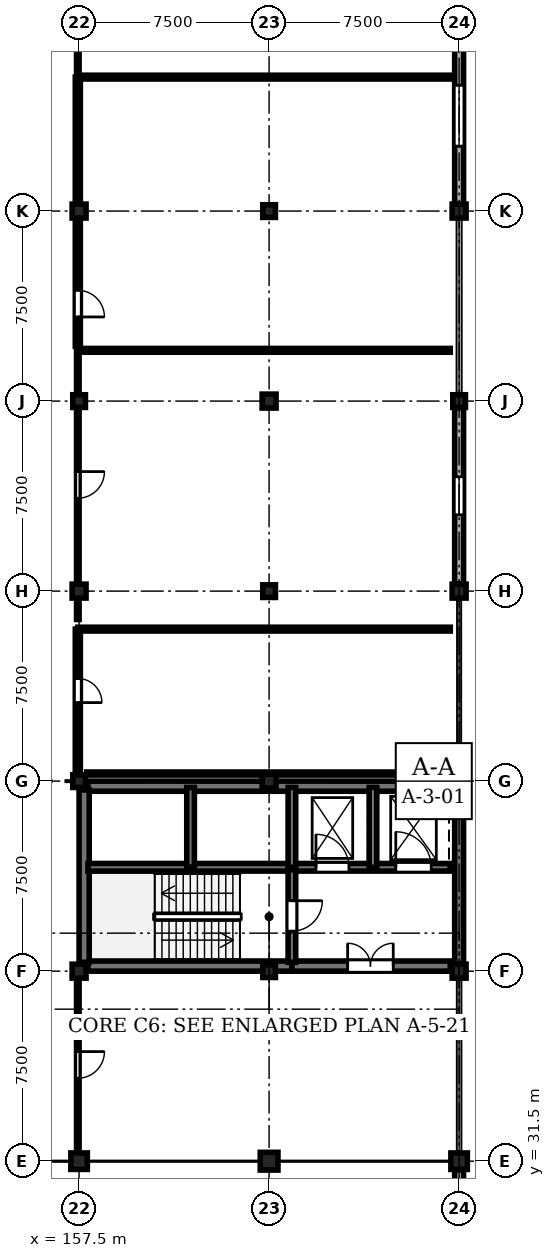
"""IFC4 building model, lengths in metres.
Left out: names, types, materials, properties, quantities, classifications, styles, units other than length and angle.
Written with IfcOpenShell. Run it as: python <this file> out.ifc"""

import sys

from ifc_helpers import new_model, si_unit, direction, frame, frame_2d, origin, origin_2d, place, context, subcontext, project, spatial, rectangle, extrude, element, fill, save


model = new_model("IFC4")
c1 = context("Model", 3, precision=1e-05, world=origin(), true_north=direction((0.0, 1.0)))
c2 = subcontext(c1, "Body", "Model", "MODEL_VIEW")
j1 = project(units=[si_unit("LENGTHUNIT", "METRE"), si_unit("PLANEANGLEUNIT", "RADIAN")], contexts=[c1])
p1 = place(None, origin())
s1 = spatial("IfcSite", under=j1, at=p1, CompositionType="ELEMENT")
p2 = place(p1, origin())
s2 = spatial("IfcBuilding", under=s1, at=p2, CompositionType="ELEMENT")
p3 = place(p2, frame((0.0, 0.0, 4.8)))
s3 = spatial("IfcBuildingStorey", under=s2, at=p3, CompositionType="ELEMENT", Elevation=4.8)
p4 = place(p3, frame((157.5, 31.5, 0.0), z_axis=(0.0, 0.0, 1.0), x_axis=(1.0, 0.0, 0.0)))
e1 = element("IfcColumn", 1, at=p4, inside=s3, PredefinedType="COLUMN", context=c2, shape_type="SweptSolid", body=[
    extrude(rectangle(XDim=0.65, YDim=0.65, at=origin_2d()), origin(), (0.0, 0.0, 1.0), 4.5),
])
p5 = place(p3, frame((157.5, 39.0, 0.0), z_axis=(0.0, 0.0, 1.0), x_axis=(1.0, 0.0, 0.0)))
e2 = element("IfcColumn", 2, at=p5, inside=s3, PredefinedType="COLUMN", context=c2, shape_type="SweptSolid", body=[
    extrude(rectangle(XDim=0.55, YDim=0.55, at=origin_2d()), origin(), (0.0, 0.0, 1.0), 4.5),
])
p6 = place(p3, frame((157.5, 46.5, 0.0), z_axis=(0.0, 0.0, 1.0), x_axis=(1.0, 0.0, 0.0)))
e3 = element("IfcColumn", 3, at=p6, inside=s3, PredefinedType="COLUMN", context=c2, shape_type="SweptSolid", body=[
    extrude(rectangle(XDim=0.5, YDim=0.5, at=origin_2d()), origin(), (0.0, 0.0, 1.0), 4.5),
])
p7 = place(p3, frame((157.5, 54.0, 0.0), z_axis=(0.0, 0.0, 1.0), x_axis=(1.0, 0.0, 0.0)))
e4 = element("IfcColumn", 4, at=p7, inside=s3, PredefinedType="COLUMN", context=c2, shape_type="SweptSolid", body=[
    extrude(rectangle(XDim=0.55, YDim=0.55, at=origin_2d()), origin(), (0.0, 0.0, 1.0), 4.5),
])
p8 = place(p3, frame((157.5, 61.5, 0.0), z_axis=(0.0, 0.0, 1.0), x_axis=(1.0, 0.0, 0.0)))
e5 = element("IfcColumn", 5, at=p8, inside=s3, PredefinedType="COLUMN", context=c2, shape_type="SweptSolid", body=[
    extrude(rectangle(XDim=0.5, YDim=0.5, at=origin_2d()), origin(), (0.0, 0.0, 1.0), 4.5),
])
p9 = place(p3, frame((157.5, 69.0, 0.0), z_axis=(0.0, 0.0, 1.0), x_axis=(1.0, 0.0, 0.0)))
e6 = element("IfcColumn", 6, at=p9, inside=s3, PredefinedType="COLUMN", context=c2, shape_type="SweptSolid", body=[
    extrude(rectangle(XDim=0.55, YDim=0.55, at=origin_2d()), origin(), (0.0, 0.0, 1.0), 4.5),
])
p10 = place(p3, frame((165.0, 31.5, 0.0), z_axis=(0.0, 0.0, 1.0), x_axis=(1.0, 0.0, 0.0)))
e7 = element("IfcColumn", 7, at=p10, inside=s3, PredefinedType="COLUMN", context=c2, shape_type="SweptSolid", body=[
    extrude(rectangle(XDim=0.7, YDim=0.7, at=origin_2d()), origin(), (0.0, 0.0, 1.0), 4.5),
])
p11 = place(p3, frame((165.0, 39.0, 0.0), z_axis=(0.0, 0.0, 1.0), x_axis=(1.0, 0.0, 0.0)))
e8 = element("IfcColumn", 8, at=p11, inside=s3, PredefinedType="COLUMN", context=c2, shape_type="SweptSolid", body=[
    extrude(rectangle(XDim=0.5, YDim=0.5, at=origin_2d()), origin(), (0.0, 0.0, 1.0), 4.5),
])
p12 = place(p3, frame((165.0, 46.5, 0.0), z_axis=(0.0, 0.0, 1.0), x_axis=(1.0, 0.0, 0.0)))
e9 = element("IfcColumn", 9, at=p12, inside=s3, PredefinedType="COLUMN", context=c2, shape_type="SweptSolid", body=[
    extrude(rectangle(XDim=0.55, YDim=0.55, at=origin_2d()), origin(), (0.0, 0.0, 1.0), 4.5),
])
p13 = place(p3, frame((165.0, 54.0, 0.0), z_axis=(0.0, 0.0, 1.0), x_axis=(1.0, 0.0, 0.0)))
e10 = element("IfcColumn", 10, at=p13, inside=s3, PredefinedType="COLUMN", context=c2, shape_type="SweptSolid", body=[
    extrude(rectangle(XDim=0.5, YDim=0.5, at=origin_2d()), origin(), (0.0, 0.0, 1.0), 4.5),
])
p14 = place(p3, frame((165.0, 61.5, 0.0), z_axis=(0.0, 0.0, 1.0), x_axis=(1.0, 0.0, 0.0)))
e11 = element("IfcColumn", 11, at=p14, inside=s3, PredefinedType="COLUMN", context=c2, shape_type="SweptSolid", body=[
    extrude(rectangle(XDim=0.55, YDim=0.55, at=origin_2d()), origin(), (0.0, 0.0, 1.0), 4.5),
])
p15 = place(p3, frame((165.0, 69.0, 0.0), z_axis=(0.0, 0.0, 1.0), x_axis=(1.0, 0.0, 0.0)))
e12 = element("IfcColumn", 12, at=p15, inside=s3, PredefinedType="COLUMN", context=c2, shape_type="SweptSolid", body=[
    extrude(rectangle(XDim=0.5, YDim=0.5, at=origin_2d()), origin(), (0.0, 0.0, 1.0), 4.5),
])
p16 = place(p3, frame((172.5, 31.5, 0.0), z_axis=(0.0, 0.0, 1.0), x_axis=(1.0, 0.0, 0.0)))
e13 = element("IfcColumn", 13, at=p16, inside=s3, PredefinedType="COLUMN", context=c2, shape_type="SweptSolid", body=[
    extrude(rectangle(XDim=0.65, YDim=0.65, at=origin_2d()), origin(), (0.0, 0.0, 1.0), 4.5),
])
p17 = place(p3, frame((172.5, 39.0, 0.0), z_axis=(0.0, 0.0, 1.0), x_axis=(1.0, 0.0, 0.0)))
e14 = element("IfcColumn", 14, at=p17, inside=s3, PredefinedType="COLUMN", context=c2, shape_type="SweptSolid", body=[
    extrude(rectangle(XDim=0.55, YDim=0.55, at=origin_2d()), origin(), (0.0, 0.0, 1.0), 4.5),
])
p18 = place(p3, frame((172.5, 46.5, 0.0), z_axis=(0.0, 0.0, 1.0), x_axis=(1.0, 0.0, 0.0)))
e15 = element("IfcColumn", 15, at=p18, inside=s3, PredefinedType="COLUMN", context=c2, shape_type="SweptSolid", body=[
    extrude(rectangle(XDim=0.5, YDim=0.5, at=origin_2d()), origin(), (0.0, 0.0, 1.0), 4.5),
])
p19 = place(p3, frame((172.5, 54.0, 0.0), z_axis=(0.0, 0.0, 1.0), x_axis=(1.0, 0.0, 0.0)))
e16 = element("IfcColumn", 16, at=p19, inside=s3, PredefinedType="COLUMN", context=c2, shape_type="SweptSolid", body=[
    extrude(rectangle(XDim=0.55, YDim=0.55, at=origin_2d()), origin(), (0.0, 0.0, 1.0), 4.5),
])
p20 = place(p3, frame((172.5, 61.5, 0.0), z_axis=(0.0, 0.0, 1.0), x_axis=(1.0, 0.0, 0.0)))
e17 = element("IfcColumn", 17, at=p20, inside=s3, PredefinedType="COLUMN", context=c2, shape_type="SweptSolid", body=[
    extrude(rectangle(XDim=0.5, YDim=0.5, at=origin_2d()), origin(), (0.0, 0.0, 1.0), 4.5),
])
p21 = place(p3, frame((172.5, 69.0, 0.0), z_axis=(0.0, 0.0, 1.0), x_axis=(1.0, 0.0, 0.0)))
e18 = element("IfcColumn", 18, at=p21, inside=s3, PredefinedType="COLUMN", context=c2, shape_type="SweptSolid", body=[
    extrude(rectangle(XDim=0.55, YDim=0.55, at=origin_2d()), origin(), (0.0, 0.0, 1.0), 4.5),
])
p22 = place(p3, frame((172.5, 31.165, 0.0), z_axis=(0.0, 0.0, 1.0), x_axis=(0.0, -1.0, 0.0)))
e19 = element("IfcWall", 19, at=p22, inside=s3, PredefinedType="STANDARD", context=c2, shape_type="SweptSolid", body=[
    extrude(rectangle(XDim=8.28, YDim=0.35, at=frame_2d((4.14, 0.0))), origin(), (0.0, 0.0, 1.0), 3.63),
])
p23 = place(p22, frame((3.44, 0.0, 0.9)))
e20 = element("IfcOpeningElement", 20, at=p23, cuts=e19, PredefinedType="OPENING", context=c2, shape_type="SweptSolid", body=[
    extrude(rectangle(XDim=1.4, YDim=1.8, at=frame_2d((0.7, 0.9))), frame((0.0, 0.185, 0.0), z_axis=(0.0, -1.0, 0.0), x_axis=(1.0, 0.0, 0.0)), (0.0, 0.0, 1.0), 0.37),
])
p24 = place(p3, frame((172.5, 46.24, 0.0), z_axis=(0.0, 0.0, 1.0), x_axis=(0.0, -1.0, 0.0)))
e21 = element("IfcWall", 21, at=p24, inside=s3, PredefinedType="SHEAR", context=c2, shape_type="SweptSolid", body=[
    extrude(rectangle(XDim=6.955, YDim=0.35, at=frame_2d((3.478, 0.0))), origin(), (0.0, 0.0, 1.0), 4.18),
])
p25 = place(p3, frame((172.5, 61.24, 0.0), z_axis=(0.0, 0.0, 1.0), x_axis=(0.0, -1.0, 0.0)))
e22 = element("IfcWall", 22, at=p25, inside=s3, PredefinedType="STANDARD", context=c2, shape_type="SweptSolid", body=[
    extrude(rectangle(XDim=6.955, YDim=0.35, at=frame_2d((3.478, 0.0))), origin(), (0.0, 0.0, 1.0), 3.63),
])
p26 = place(p25, frame((2.728, 0.0, 0.9)))
e23 = element("IfcOpeningElement", 23, at=p26, cuts=e22, PredefinedType="OPENING", context=c2, shape_type="SweptSolid", body=[
    extrude(rectangle(XDim=1.5, YDim=2.4, at=frame_2d((0.75, 1.2))), frame((0.0, 0.185, 0.0), z_axis=(0.0, -1.0, 0.0), x_axis=(1.0, 0.0, 0.0)), (0.0, 0.0, 1.0), 0.37),
])
p27 = place(p3, frame((172.5, 76.24, 0.0), z_axis=(0.0, 0.0, 1.0), x_axis=(0.0, -1.0, 0.0)))
e24 = element("IfcWall", 24, at=p27, inside=s3, PredefinedType="STANDARD", context=c2, shape_type="SweptSolid", body=[
    extrude(rectangle(XDim=6.955, YDim=0.35, at=frame_2d((3.478, 0.0))), origin(), (0.0, 0.0, 1.0), 3.63),
])
p28 = place(p27, frame((2.278, 0.0, 0.9)))
e25 = element("IfcOpeningElement", 25, at=p28, cuts=e24, PredefinedType="OPENING", context=c2, shape_type="SweptSolid", body=[
    extrude(rectangle(XDim=2.4, YDim=2.45, at=frame_2d((1.2, 1.225))), frame((0.0, 0.185, 0.0), z_axis=(0.0, -1.0, 0.0), x_axis=(1.0, 0.0, 0.0)), (0.0, 0.0, 1.0), 0.37),
])
p29 = place(p3, frame((157.85, 39.2, 0.0), z_axis=(0.0, 0.0, 1.0), x_axis=(1.0, 0.0, 0.0)))
e26 = element("IfcWall", 26, at=p29, inside=s3, PredefinedType="SHEAR", context=c2, shape_type="SweptSolid", body=[
    extrude(rectangle(XDim=8.05, YDim=0.4, at=frame_2d((4.025, 0.0))), origin(), (0.0, 0.0, 1.0), 4.18),
])
p30 = place(p3, frame((165.9, 39.2, 0.0), z_axis=(0.0, 0.0, 1.0), x_axis=(1.0, 0.0, 0.0)))
e27 = element("IfcWall", 27, at=p30, inside=s3, PredefinedType="SHEAR", context=c2, shape_type="SweptSolid", body=[
    extrude(rectangle(XDim=6.25, YDim=0.4, at=frame_2d((3.125, 0.0))), origin(), (0.0, 0.0, 1.0), 4.18),
])
p31 = place(p30, frame((2.2, 0.0, 0.0)))
e28 = element("IfcOpeningElement", 28, at=p31, cuts=e27, PredefinedType="OPENING", context=c2, shape_type="SweptSolid", body=[
    extrude(rectangle(XDim=1.8, YDim=2.25, at=frame_2d((0.9, 1.125))), frame((0.0, 0.21, 0.0), z_axis=(0.0, -1.0, 0.0), x_axis=(1.0, 0.0, 0.0)), (0.0, 0.0, 1.0), 0.42),
])
p32 = place(p3, frame((157.85, 46.3, 0.0), z_axis=(0.0, 0.0, 1.0), x_axis=(1.0, 0.0, 0.0)))
e29 = element("IfcWall", 29, at=p32, inside=s3, PredefinedType="SHEAR", context=c2, shape_type="SweptSolid", body=[
    extrude(rectangle(XDim=14.3, YDim=0.4, at=frame_2d((7.15, 0.0))), origin(), (0.0, 0.0, 1.0), 4.18),
])
p33 = place(p3, frame((157.7, 39.35, 0.0), z_axis=(0.0, 0.0, 1.0), x_axis=(0.0, 1.0, 0.0)))
e30 = element("IfcWall", 30, at=p33, inside=s3, PredefinedType="SHEAR", context=c2, shape_type="SweptSolid", body=[
    extrude(rectangle(XDim=6.8, YDim=0.4, at=frame_2d((3.4, 0.0))), origin(), (0.0, 0.0, 1.0), 4.18),
])
p34 = place(p3, frame((157.85, 43.1, 0.0), z_axis=(0.0, 0.0, 1.0), x_axis=(1.0, 0.0, 0.0)))
e31 = element("IfcWall", 31, at=p34, inside=s3, PredefinedType="SHEAR", context=c2, shape_type="SweptSolid", body=[
    extrude(rectangle(XDim=8.05, YDim=0.3, at=frame_2d((4.025, 0.0))), origin(), (0.0, 0.0, 1.0), 4.18),
])
p35 = place(p3, frame((165.9, 43.1, 0.0), z_axis=(0.0, 0.0, 1.0), x_axis=(1.0, 0.0, 0.0)))
e32 = element("IfcWall", 32, at=p35, inside=s3, PredefinedType="SHEAR", context=c2, shape_type="SweptSolid", body=[
    extrude(rectangle(XDim=6.25, YDim=0.3, at=frame_2d((3.125, 0.0))), origin(), (0.0, 0.0, 1.0), 4.18),
])
p36 = place(p35, frame((0.95, 0.0, 0.0)))
e33 = element("IfcOpeningElement", 33, at=p36, cuts=e32, PredefinedType="OPENING", context=c2, shape_type="SweptSolid", body=[
    extrude(rectangle(XDim=1.3, YDim=2.2, at=frame_2d((0.65, 1.1))), frame((0.0, 0.16, 0.0), z_axis=(0.0, -1.0, 0.0), x_axis=(1.0, 0.0, 0.0)), (0.0, 0.0, 1.0), 0.32),
])
p37 = place(p35, frame((4.1, 0.0, 0.0)))
e34 = element("IfcOpeningElement", 34, at=p37, cuts=e32, PredefinedType="OPENING", context=c2, shape_type="SweptSolid", body=[
    extrude(rectangle(XDim=1.4, YDim=2.25, at=frame_2d((0.7, 1.125))), frame((0.0, 0.16, 0.0), z_axis=(0.0, -1.0, 0.0), x_axis=(1.0, 0.0, 0.0)), (0.0, 0.0, 1.0), 0.32),
])
p38 = place(p3, frame((165.9, 43.0, 0.0), z_axis=(0.0, 0.0, 1.0), x_axis=(0.0, -1.0, 0.0)))
e35 = element("IfcWall", 35, at=p38, inside=s3, PredefinedType="SHEAR", context=c2, shape_type="SweptSolid", body=[
    extrude(rectangle(XDim=3.65, YDim=0.3, at=frame_2d((1.825, 0.0))), origin(), (0.0, 0.0, 1.0), 4.18),
])
p39 = place(p38, frame((1.22, 0.0, 0.0)))
e36 = element("IfcOpeningElement", 36, at=p39, cuts=e35, PredefinedType="OPENING", context=c2, shape_type="SweptSolid", body=[
    extrude(rectangle(XDim=1.2, YDim=2.25, at=frame_2d((0.6, 1.125))), frame((0.0, 0.16, 0.0), z_axis=(0.0, -1.0, 0.0), x_axis=(1.0, 0.0, 0.0)), (0.0, 0.0, 1.0), 0.32),
])
for number, where, z_axis, x_axis in (
    (37, (161.9, 43.1, 0.0), (0.0, 0.0, 1.0), (0.0, 1.0, 0.0)),
    (38, (165.9, 43.1, 0.0), (0.0, 0.0, 1.0), (0.0, 1.0, 0.0)),
    (39, (169.1, 43.1, 0.0), (0.0, 0.0, 1.0), (0.0, 1.0, 0.0)),
):
    element("IfcWall", number, at=place(p3, frame(where, z_axis=z_axis, x_axis=x_axis)), inside=s3, PredefinedType="SHEAR", context=c2, shape_type="SweptSolid", body=[
        extrude(rectangle(XDim=3.15, YDim=0.3, at=frame_2d((1.575, 0.0))), origin(), (0.0, 0.0, 1.0), 4.18),
    ])
p40 = place(p3, frame((157.45, 38.75, 0.0), z_axis=(0.0, 0.0, 1.0), x_axis=(0.0, -1.0, 0.0)))
e40 = element("IfcWall", 40, at=p40, inside=s3, PredefinedType="PARTITIONING", context=c2, shape_type="SweptSolid", body=[
    extrude(rectangle(XDim=6.9, YDim=0.1, at=frame_2d((3.45, 0.0))), origin(), (0.0, 0.0, 1.0), 3.565),
])
p41 = place(p40, frame((2.925, 0.0, 0.0)))
e41 = element("IfcOpeningElement", 41, at=p41, cuts=e40, PredefinedType="OPENING", context=c2, shape_type="SweptSolid", body=[
    extrude(rectangle(XDim=1.05, YDim=2.2, at=frame_2d((0.525, 1.1))), frame((0.0, 0.06, 0.0), z_axis=(0.0, -1.0, 0.0), x_axis=(1.0, 0.0, 0.0)), (0.0, 0.0, 1.0), 0.12),
])
p42 = place(p3, frame((157.45, 52.5, 0.0), z_axis=(0.0, 0.0, 1.0), x_axis=(0.0, -1.0, 0.0)))
e42 = element("IfcWall", 42, at=p42, inside=s3, PredefinedType="STANDARD", context=c2, shape_type="SweptSolid", body=[
    extrude(rectangle(XDim=5.7, YDim=0.2, at=frame_2d((2.85, 0.0))), origin(), (0.0, 0.0, 1.0), 3.565),
])
p43 = place(p42, frame((1.95, 0.0, 0.0)))
e43 = element("IfcOpeningElement", 43, at=p43, cuts=e42, PredefinedType="OPENING", context=c2, shape_type="SweptSolid", body=[
    extrude(rectangle(XDim=0.95, YDim=2.15, at=frame_2d((0.475, 1.075))), frame((0.0, 0.11, 0.0), z_axis=(0.0, -1.0, 0.0), x_axis=(1.0, 0.0, 0.0)), (0.0, 0.0, 1.0), 0.22),
])
p44 = place(p3, frame((157.45, 63.503, 0.0), z_axis=(0.0, 0.0, 1.0), x_axis=(0.0, -1.0, 0.0)))
e44 = element("IfcWall", 44, at=p44, inside=s3, PredefinedType="PARTITIONING", context=c2, shape_type="SweptSolid", body=[
    extrude(rectangle(XDim=10.624, YDim=0.1, at=frame_2d((5.312, 0.0))), origin(), (0.0, 0.0, 1.0), 3.565),
])
p45 = place(p44, frame((4.787, 0.0, 0.0)))
e45 = element("IfcOpeningElement", 45, at=p45, cuts=e44, PredefinedType="OPENING", context=c2, shape_type="SweptSolid", body=[
    extrude(rectangle(XDim=1.05, YDim=2.2, at=frame_2d((0.525, 1.1))), frame((0.0, 0.06, 0.0), z_axis=(0.0, -1.0, 0.0), x_axis=(1.0, 0.0, 0.0)), (0.0, 0.0, 1.0), 0.12),
])
p46 = place(p3, frame((157.45, 74.287, 0.0), z_axis=(0.0, 0.0, 1.0), x_axis=(0.0, -1.0, 0.0)))
e46 = element("IfcWall", 46, at=p46, inside=s3, PredefinedType="STANDARD", context=c2, shape_type="SweptSolid", body=[
    extrude(rectangle(XDim=10.623, YDim=0.2, at=frame_2d((5.312, 0.0))), origin(), (0.0, 0.0, 1.0), 3.565),
])
p47 = place(p46, frame((8.416, 0.0, 0.0)))
e47 = element("IfcOpeningElement", 47, at=p47, cuts=e46, PredefinedType="OPENING", context=c2, shape_type="SweptSolid", body=[
    extrude(rectangle(XDim=1.05, YDim=2.2, at=frame_2d((0.525, 1.1))), frame((0.0, 0.11, 0.0), z_axis=(0.0, -1.0, 0.0), x_axis=(1.0, 0.0, 0.0)), (0.0, 0.0, 1.0), 0.22),
])
p48 = place(p3, frame((157.45, 85.07, 0.0), z_axis=(0.0, 0.0, 1.0), x_axis=(0.0, -1.0, 0.0)))
e48 = element("IfcWall", 48, at=p48, inside=s3, PredefinedType="PARTITIONING", context=c2, shape_type="SweptSolid", body=[
    extrude(rectangle(XDim=10.623, YDim=0.1, at=frame_2d((5.312, 0.0))), origin(), (0.0, 0.0, 1.0), 3.465),
])
p49 = place(p48, frame((3.879, 0.0, 0.0)))
e49 = element("IfcOpeningElement", 49, at=p49, cuts=e48, PredefinedType="OPENING", context=c2, shape_type="SweptSolid", body=[
    extrude(rectangle(XDim=1.05, YDim=2.2, at=frame_2d((0.525, 1.1))), frame((0.0, 0.06, 0.0), z_axis=(0.0, -1.0, 0.0), x_axis=(1.0, 0.0, 0.0)), (0.0, 0.0, 1.0), 0.12),
])
for number, where, z_axis, x_axis in (
    (50, (157.45, 52.5, 0.0), (0.0, 0.0, 1.0), (1.0, 0.0, 0.0)),
    (51, (157.45, 63.503, 0.0), (0.0, 0.0, 1.0), (1.0, 0.0, 0.0)),
    (52, (157.45, 74.287, 0.0), (0.0, 0.0, 1.0), (1.0, 0.0, 0.0)),
):
    element("IfcWall", number, at=place(p3, frame(where, z_axis=z_axis, x_axis=x_axis)), inside=s3, PredefinedType="PARTITIONING", context=c2, shape_type="SweptSolid", body=[
        extrude(rectangle(XDim=14.7, YDim=0.15, at=frame_2d((7.35, 0.0))), origin(), (0.0, 0.0, 1.0), 4.165),
    ])
p50 = place(p3, frame((157.8, 46.8, 0.0), z_axis=(0.0, 0.0, 1.0), x_axis=(1.0, 0.0, 0.0)))
e53 = element("IfcWall", 53, at=p50, inside=s3, PredefinedType="PARTITIONING", context=c2, shape_type="SweptSolid", body=[
    extrude(rectangle(XDim=14.35, YDim=0.12, at=frame_2d((7.175, 0.0))), origin(), (0.0, 0.0, 1.0), 3.515),
])
p51 = place(p26, origin())
e54 = element("IfcWindow", 54, at=p51, inside=s3, PartitioningType="SINGLE_PANEL", PredefinedType="WINDOW", context=c2, shape_type="SweptSolid", body=[
    extrude(rectangle(XDim=1.5, YDim=2.4, at=frame_2d((0.75, 1.2))), frame((0.0, 0.03, 0.0), z_axis=(0.0, -1.0, 0.0), x_axis=(1.0, 0.0, 0.0)), (0.0, 0.0, 1.0), 0.06),
])
fill(e23, e54)
p52 = place(p28, origin())
e55 = element("IfcWindow", 55, at=p52, inside=s3, PartitioningType="SINGLE_PANEL", PredefinedType="WINDOW", context=c2, shape_type="SweptSolid", body=[
    extrude(rectangle(XDim=2.4, YDim=2.45, at=frame_2d((1.2, 1.225))), frame((0.0, 0.03, 0.0), z_axis=(0.0, -1.0, 0.0), x_axis=(1.0, 0.0, 0.0)), (0.0, 0.0, 1.0), 0.06),
])
fill(e25, e55)
p53 = place(p31, origin())
e56 = element("IfcDoor", 56, at=p53, inside=s3, OperationType="DOUBLE_DOOR_SINGLE_SWING", PredefinedType="DOOR", context=c2, shape_type="SweptSolid", body=[
    extrude(rectangle(XDim=1.8, YDim=2.25, at=frame_2d((0.9, 1.125))), frame((0.0, 0.025, 0.0), z_axis=(0.0, -1.0, 0.0), x_axis=(1.0, 0.0, 0.0)), (0.0, 0.0, 1.0), 0.05),
])
fill(e28, e56)
p54 = place(p36, origin())
e57 = element("IfcDoor", 57, at=p54, inside=s3, OperationType="DOUBLE_DOOR_SLIDING", PredefinedType="DOOR", context=c2, shape_type="SweptSolid", body=[
    extrude(rectangle(XDim=1.3, YDim=2.2, at=frame_2d((0.65, 1.1))), frame((0.0, 0.025, 0.0), z_axis=(0.0, -1.0, 0.0), x_axis=(1.0, 0.0, 0.0)), (0.0, 0.0, 1.0), 0.05),
])
fill(e33, e57)
p55 = place(p37, origin())
e58 = element("IfcDoor", 58, at=p55, inside=s3, OperationType="DOUBLE_DOOR_SLIDING", PredefinedType="DOOR", context=c2, shape_type="SweptSolid", body=[
    extrude(rectangle(XDim=1.4, YDim=2.25, at=frame_2d((0.7, 1.125))), frame((0.0, 0.025, 0.0), z_axis=(0.0, -1.0, 0.0), x_axis=(1.0, 0.0, 0.0)), (0.0, 0.0, 1.0), 0.05),
])
fill(e34, e58)
p56 = place(p39, origin())
e59 = element("IfcDoor", 59, at=p56, inside=s3, OperationType="SINGLE_SWING_LEFT", PredefinedType="DOOR", context=c2, shape_type="SweptSolid", body=[
    extrude(rectangle(XDim=1.2, YDim=2.25, at=frame_2d((0.6, 1.125))), frame((0.0, 0.025, 0.0), z_axis=(0.0, -1.0, 0.0), x_axis=(1.0, 0.0, 0.0)), (0.0, 0.0, 1.0), 0.05),
])
fill(e36, e59)
p57 = place(p41, origin())
e60 = element("IfcDoor", 60, at=p57, inside=s3, OperationType="SINGLE_SWING_LEFT", PredefinedType="DOOR", context=c2, shape_type="SweptSolid", body=[
    extrude(rectangle(XDim=1.05, YDim=2.2, at=frame_2d((0.525, 1.1))), frame((0.0, 0.025, 0.0), z_axis=(0.0, -1.0, 0.0), x_axis=(1.0, 0.0, 0.0)), (0.0, 0.0, 1.0), 0.05),
])
fill(e41, e60)
p58 = place(p43, origin())
e61 = element("IfcDoor", 61, at=p58, inside=s3, OperationType="SINGLE_SWING_RIGHT", PredefinedType="DOOR", context=c2, shape_type="SweptSolid", body=[
    extrude(rectangle(XDim=0.95, YDim=2.15, at=frame_2d((0.475, 1.075))), frame((0.0, 0.025, 0.0), z_axis=(0.0, -1.0, 0.0), x_axis=(1.0, 0.0, 0.0)), (0.0, 0.0, 1.0), 0.05),
])
fill(e43, e61)
p59 = place(p45, origin())
e62 = element("IfcDoor", 62, at=p59, inside=s3, OperationType="SINGLE_SWING_LEFT", PredefinedType="DOOR", context=c2, shape_type="SweptSolid", body=[
    extrude(rectangle(XDim=1.05, YDim=2.2, at=frame_2d((0.525, 1.1))), frame((0.0, 0.025, 0.0), z_axis=(0.0, -1.0, 0.0), x_axis=(1.0, 0.0, 0.0)), (0.0, 0.0, 1.0), 0.05),
])
fill(e45, e62)
p60 = place(p47, origin())
e63 = element("IfcDoor", 63, at=p60, inside=s3, OperationType="SINGLE_SWING_RIGHT", PredefinedType="DOOR", context=c2, shape_type="SweptSolid", body=[
    extrude(rectangle(XDim=1.05, YDim=2.2, at=frame_2d((0.525, 1.1))), frame((0.0, 0.025, 0.0), z_axis=(0.0, -1.0, 0.0), x_axis=(1.0, 0.0, 0.0)), (0.0, 0.0, 1.0), 0.05),
])
fill(e47, e63)
save(model, sys.argv[1])
